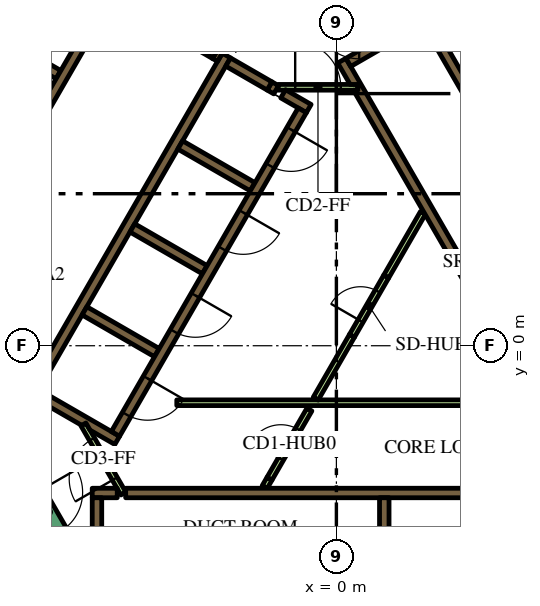
"""IFC4 building model, lengths in metres.
Left out: names, types, materials, properties, quantities, classifications, styles, units other than length and angle.
Written with IfcOpenShell. Run it as: python <this file> out.ifc"""

import sys

from ifc_helpers import new_model, si_unit, direction, frame, frame_2d, origin, place, context, subcontext, project, spatial, polyline, rectangle, outline, extrude, element, fill, save


model = new_model("IFC4")
c1 = context("Model", 3, precision=1e-05, world=origin(), true_north=direction((0.0, 1.0)))
c2 = subcontext(c1, "Body", "Model", "MODEL_VIEW")
j1 = project(units=[si_unit("LENGTHUNIT", "METRE"), si_unit("PLANEANGLEUNIT", "RADIAN")], contexts=[c1])
p1 = place(None, origin())
s1 = spatial("IfcSite", under=j1, at=p1, CompositionType="ELEMENT")
p2 = place(p1, origin())
s2 = spatial("IfcBuilding", under=s1, at=p2, CompositionType="ELEMENT")
p3 = place(p2, frame((0.0, 0.0, 95.4)))
s3 = spatial("IfcBuildingStorey", under=s2, at=p3, CompositionType="ELEMENT", Elevation=95.4)
p4 = place(p3, frame((-15.36, -1.503, 0.0), z_axis=(0.0, 0.0, 1.0), x_axis=(0.50000389221, 0.866023156604, 0.0)))
e1 = element("IfcWall", 1, at=p4, inside=s3, PredefinedType="SOLIDWALL", context=c2, shape_type="SweptSolid", body=[
    extrude(rectangle(XDim=21.0, YDim=0.9, at=frame_2d((10.5, 0.0))), origin(), (0.0, 0.0, 1.0), 3.9),
])
p5 = place(p3, frame((-5.545, -3.875, 0.0), z_axis=(0.0, 0.0, 1.0), x_axis=(1.0, 0.0, 0.0)))
e2 = element("IfcWall", 2, at=p5, inside=s3, PredefinedType="SOLIDWALL", context=c2, shape_type="SweptSolid", body=[
    extrude(rectangle(XDim=11.97, YDim=0.25, at=frame_2d((5.985, 0.0))), origin(), (0.0, 0.0, 1.0), 3.9),
])
p6 = place(p3, frame((-6.425, -3.875, 0.0), z_axis=(0.0, 0.0, 1.0), x_axis=(1.0, 0.0, 0.0)))
e3 = element("IfcWall", 3, at=p6, inside=s3, PredefinedType="SOLIDWALL", context=c2, shape_type="SweptSolid", body=[
    extrude(rectangle(XDim=0.658, YDim=0.25, at=frame_2d((0.329, 0.0))), origin(), (0.0, 0.0, 1.0), 3.9),
])
p7 = place(p3, frame((1.26, -4.0, 0.0), z_axis=(0.0, 0.0, 1.0), x_axis=(0.0, -1.0, 0.0)))
e4 = element("IfcWall", 4, at=p7, inside=s3, PredefinedType="SOLIDWALL", context=c2, shape_type="SweptSolid", body=[
    extrude(rectangle(XDim=2.2, YDim=0.25, at=frame_2d((1.1, 0.0))), origin(), (0.0, 0.0, 1.0), 3.9),
])
p8 = place(p3, frame((-6.3, -4.0, 0.0), z_axis=(0.0, 0.0, 1.0), x_axis=(0.0, -1.0, 0.0)))
e5 = element("IfcWall", 5, at=p8, inside=s3, PredefinedType="SOLIDWALL", context=c2, shape_type="SweptSolid", body=[
    extrude(rectangle(XDim=3.154, YDim=0.25, at=frame_2d((1.577, 0.0))), origin(), (0.0, 0.0, 1.0), 3.9),
])
p9 = place(p3, origin())
e6 = element("IfcWall", 6, at=p9, inside=s3, PredefinedType="SOLIDWALL", context=c2, shape_type="SweptSolid", body=[
    extrude(outline(polyline([(0.566, 6.725), (0.566, 6.875), (0.566, 6.875), (0.565, 6.875), (0.361, 6.875), (0.035, 7.439), (0.252, 7.564), (0.377, 7.348), (6.552, -3.348), (6.677, -3.564), (6.46, -3.689), (0.448, 6.725), (0.565, 6.725), (0.566, 6.725), (0.566, 6.725)])), origin(), (0.0, 0.0, 1.0), 3.9),
])
p10 = place(p3, frame((0.314, 7.456, 0.0), z_axis=(0.0, 0.0, 1.0), x_axis=(0.866013897511, 0.50001992892, 0.0)))
e7 = element("IfcWall", 7, at=p10, inside=s3, PredefinedType="SOLIDWALL", context=c2, shape_type="SweptSolid", body=[
    extrude(rectangle(XDim=3.268, YDim=0.25, at=frame_2d((1.634, 0.0))), origin(), (0.0, 0.0, 1.0), 3.9),
])
p11 = place(p3, frame((-8.06, -1.311, 0.0), z_axis=(0.0, 0.0, 1.0), x_axis=(0.50000273126, 0.866023826885, 0.0)))
e8 = element("IfcWall", 8, at=p11, inside=s3, PredefinedType="SOLIDWALL", context=c2, shape_type="SweptSolid", body=[
    extrude(rectangle(XDim=10.33, YDim=0.25, at=frame_2d((5.165, 0.0))), origin(), (0.0, 0.0, 1.0), 3.9),
])
p12 = place(p3, frame((-1.758, 6.835, 0.0), z_axis=(0.0, 0.0, 1.0), x_axis=(0.865982457891, -0.500074377092, 0.0)))
e9 = element("IfcWall", 9, at=p12, inside=s3, PredefinedType="SOLIDWALL", context=c2, shape_type="SweptSolid", body=[
    extrude(rectangle(XDim=0.2, YDim=0.25, at=frame_2d((0.1, 0.0))), origin(), (0.0, 0.0, 1.0), 3.9),
])
p13 = place(p3, frame((-1.76, 6.836, 0.0), z_axis=(0.0, 0.0, 1.0), x_axis=(-0.865952863304, 0.500125622755, 0.0)))
e10 = element("IfcWall", 10, at=p13, inside=s3, PredefinedType="SOLIDWALL", context=c2, shape_type="SweptSolid", body=[
    extrude(rectangle(XDim=1.258, YDim=0.25, at=frame_2d((0.629, 0.0))), origin(), (0.0, 0.0, 1.0), 3.9),
])
p14 = place(p3, frame((-0.728, 6.24, 0.0), z_axis=(0.0, 0.0, 1.0), x_axis=(-0.865955664968, 0.500120771724, 0.0)))
e11 = element("IfcWall", 11, at=p14, inside=s3, PredefinedType="SOLIDWALL", context=c2, shape_type="SweptSolid", body=[
    extrude(rectangle(XDim=0.778, YDim=0.25, at=frame_2d((0.389, 0.0))), origin(), (0.0, 0.0, 1.0), 3.9),
])
for number, where, z_axis, x_axis in (
    (12, (-2.204, 4.182, 0.0), (0.0, 0.0, 1.0), (-0.866, 0.5, 0.0)),
    (13, (-5.369, 3.1, 0.0), (0.0, 0.0, 1.0), (0.866, -0.5, 0.0)),
    (14, (-4.724, -0.182, 0.0), (0.0, 0.0, 1.0), (-0.866, 0.5, 0.0)),
):
    element("IfcWall", number, at=place(p3, frame(where, z_axis=z_axis, x_axis=x_axis)), inside=s3, PredefinedType="SOLIDWALL", context=c2, shape_type="SweptSolid", body=[
        extrude(rectangle(XDim=2.2, YDim=0.25, at=frame_2d((1.1, 0.0))), origin(), (0.0, 0.0, 1.0), 3.9),
    ])
e15 = element("IfcWall", 15, at=p9, inside=s3, PredefinedType="SOLIDWALL", context=c2, shape_type="SweptSolid", body=[
    extrude(outline(polyline([(-5.922, -2.257), (-5.922, -2.257), (-5.705, -2.382), (-5.83, -2.598), (-6.483, -2.221), (-6.591, -2.033), (-6.591, -2.033), (-6.7, -2.096), (-7.952, -1.373), (-7.827, -1.156), (-5.922, -2.257)])), origin(), (0.0, 0.0, 1.0), 3.9),
])
e16 = element("IfcWall", 16, at=p9, inside=s3, PredefinedType="SOLIDWALL", context=c2, shape_type="SweptSolid", body=[
    extrude(outline(polyline([(-3.128, 7.481), (-3.259, 7.557), (-3.134, 7.773), (-3.003, 7.698), (-3.128, 7.481)])), origin(), (0.0, 0.0, 1.0), 3.9),
])
p15 = place(p3, frame((-7.314, 7.132, 0.0), z_axis=(0.0, 0.0, 1.0), x_axis=(-0.866008176907, 0.50002983664, 0.0)))
e17 = element("IfcWall", 17, at=p15, inside=s3, PredefinedType="SOLIDWALL", context=c2, shape_type="SweptSolid", body=[
    extrude(rectangle(XDim=2.2, YDim=0.25, at=frame_2d((1.1, 0.0))), origin(), (0.0, 0.0, 1.0), 3.9),
])
p16 = place(p3, frame((-1.887, -3.718, 0.0), z_axis=(0.0, 0.0, 1.0), x_axis=(0.500165633897, 0.865929753888, 0.0)))
e18 = element("IfcWall", 18, at=p16, inside=s3, PredefinedType="PARTITIONING", context=c2, shape_type="SweptSolid", body=[
    extrude(rectangle(XDim=0.254, YDim=0.15, at=frame_2d((0.127, 0.0))), origin(), (0.0, 0.0, 1.0), 2.75),
])
p17 = place(p3, frame((-4.2, -1.5, 0.0), z_axis=(0.0, 0.0, 1.0), x_axis=(1.0, 0.0, 0.0)))
e19 = element("IfcWall", 19, at=p17, inside=s3, PredefinedType="PARTITIONING", context=c2, shape_type="SweptSolid", body=[
    extrude(rectangle(XDim=9.359, YDim=0.15, at=frame_2d((4.68, 0.0))), origin(), (0.0, 0.0, 1.0), 2.75),
])
p18 = place(p3, frame((-0.544, -1.393, 0.0), z_axis=(0.0, 0.0, 1.0), x_axis=(0.499928740635, 0.866066541489, 0.0)))
e20 = element("IfcWall", 20, at=p18, inside=s3, PredefinedType="PARTITIONING", context=c2, shape_type="SweptSolid", body=[
    extrude(rectangle(XDim=1.912, YDim=0.15, at=frame_2d((0.956, 0.0))), origin(), (0.0, 0.0, 1.0), 2.75),
])
p19 = place(p3, frame((1.312, 1.822, 0.0), z_axis=(0.0, 0.0, 1.0), x_axis=(0.500003549559, 0.866023354436, 0.0)))
e21 = element("IfcWall", 21, at=p19, inside=s3, PredefinedType="PARTITIONING", context=c2, shape_type="SweptSolid", body=[
    extrude(rectangle(XDim=1.93, YDim=0.15, at=frame_2d((0.965, 0.0))), origin(), (0.0, 0.0, 1.0), 2.75),
])
p20 = place(p3, frame((8.565, -2.185, 0.0), z_axis=(0.0, 0.0, 1.0), x_axis=(-0.499997954832, 0.866026584559, 0.0)))
e22 = element("IfcWall", 22, at=p20, inside=s3, PredefinedType="SOLIDWALL", context=c2, shape_type="SweptSolid", body=[
    extrude(rectangle(XDim=12.35, YDim=0.25, at=frame_2d((6.175, 0.0))), origin(), (0.0, 0.0, 1.0), 3.9),
])
p21 = place(p20, frame((5.725, 0.0, 0.0)))
e23 = element("IfcOpeningElement", 23, at=p21, cuts=e22, PredefinedType="OPENING", context=c2, shape_type="SweptSolid", body=[
    extrude(rectangle(XDim=0.9, YDim=2.1, at=frame_2d((0.45, 1.05))), frame((0.0, 0.135, 0.0), z_axis=(0.0, -1.0, 0.0), x_axis=(1.0, 0.0, 0.0)), (0.0, 0.0, 1.0), 0.27),
])
p22 = place(p3, frame((-6.008, 9.144, 0.0), z_axis=(0.0, 0.0, 1.0), x_axis=(-0.500006956611, -0.866021387346, 0.0)))
e24 = element("IfcWall", 24, at=p22, inside=s3, PredefinedType="SOLIDWALL", context=c2, shape_type="SweptSolid", body=[
    extrude(rectangle(XDim=9.83, YDim=0.25, at=frame_2d((4.915, 0.0))), origin(), (0.0, 0.0, 1.0), 3.9),
])
p23 = place(p22, frame((6.985, 0.0, 0.0)))
e25 = element("IfcOpeningElement", 25, at=p23, cuts=e24, PredefinedType="OPENING", context=c2, shape_type="SweptSolid", body=[
    extrude(rectangle(XDim=0.9, YDim=2.1, at=frame_2d((0.45, 1.05))), frame((0.0, 0.135, 0.0), z_axis=(0.0, -1.0, 0.0), x_axis=(1.0, 0.0, 0.0)), (0.0, 0.0, 1.0), 0.27),
])
p24 = place(p3, frame((-0.898, 6.194, 0.0), z_axis=(0.0, 0.0, 1.0), x_axis=(-0.499996202215, -0.866027596426, 0.0)))
e26 = element("IfcWall", 26, at=p24, inside=s3, PredefinedType="SOLIDWALL", context=c2, shape_type="SweptSolid", body=[
    extrude(rectangle(XDim=9.83, YDim=0.25, at=frame_2d((4.915, 0.0))), origin(), (0.0, 0.0, 1.0), 3.9),
])
p25 = place(p24, frame((0.585, 0.0, 0.0)))
e27 = element("IfcOpeningElement", 27, at=p25, cuts=e26, PredefinedType="OPENING", context=c2, shape_type="SweptSolid", body=[
    extrude(rectangle(XDim=1.1, YDim=2.1, at=frame_2d((0.55, 1.05))), frame((0.0, 0.135, 0.0), z_axis=(0.0, -1.0, 0.0), x_axis=(1.0, 0.0, 0.0)), (0.0, 0.0, 1.0), 0.27),
])
p26 = place(p24, frame((3.105, 0.0, 0.0)))
e28 = element("IfcOpeningElement", 28, at=p26, cuts=e26, PredefinedType="OPENING", context=c2, shape_type="SweptSolid", body=[
    extrude(rectangle(XDim=1.1, YDim=2.1, at=frame_2d((0.55, 1.05))), frame((0.0, 0.135, 0.0), z_axis=(0.0, -1.0, 0.0), x_axis=(1.0, 0.0, 0.0)), (0.0, 0.0, 1.0), 0.27),
])
p27 = place(p24, frame((5.625, 0.0, 0.0)))
e29 = element("IfcOpeningElement", 29, at=p27, cuts=e26, PredefinedType="OPENING", context=c2, shape_type="SweptSolid", body=[
    extrude(rectangle(XDim=1.1, YDim=2.1, at=frame_2d((0.55, 1.05))), frame((0.0, 0.135, 0.0), z_axis=(0.0, -1.0, 0.0), x_axis=(1.0, 0.0, 0.0)), (0.0, 0.0, 1.0), 0.27),
])
p28 = place(p24, frame((8.145, 0.0, 0.0)))
e30 = element("IfcOpeningElement", 30, at=p28, cuts=e26, PredefinedType="OPENING", context=c2, shape_type="SweptSolid", body=[
    extrude(rectangle(XDim=1.1, YDim=2.1, at=frame_2d((0.55, 1.05))), frame((0.0, 0.135, 0.0), z_axis=(0.0, -1.0, 0.0), x_axis=(1.0, 0.0, 0.0)), (0.0, 0.0, 1.0), 0.27),
])
p29 = place(p3, frame((-8.103, -3.466, 0.0), z_axis=(0.0, 0.0, 1.0), x_axis=(0.500078061341, -0.865980330357, 0.0)))
e31 = element("IfcWall", 31, at=p29, inside=s3, PredefinedType="SOLIDWALL", context=c2, shape_type="SweptSolid", body=[
    extrude(rectangle(XDim=2.1, YDim=0.4, at=frame_2d((1.05, 0.0))), origin(), (0.0, 0.0, 1.0), 3.9),
])
p30 = place(p29, frame((0.45, 0.0, 0.0)))
e32 = element("IfcOpeningElement", 32, at=p30, cuts=e31, PredefinedType="OPENING", context=c2, shape_type="SweptSolid", body=[
    extrude(rectangle(XDim=1.2, YDim=2.1, at=frame_2d((0.6, 1.05))), frame((0.0, 0.21, 0.0), z_axis=(0.0, -1.0, 0.0), x_axis=(1.0, 0.0, 0.0)), (0.0, 0.0, 1.0), 0.42),
])
p31 = place(p3, frame((-1.76, -3.498, 0.0), z_axis=(0.0, 0.0, 1.0), x_axis=(0.499977374825, 0.866038466041, 0.0)))
e33 = element("IfcWall", 33, at=p31, inside=s3, PredefinedType="PARTITIONING", context=c2, shape_type="SweptSolid", body=[
    extrude(rectangle(XDim=2.1, YDim=0.15, at=frame_2d((1.05, 0.0))), origin(), (0.0, 0.0, 1.0), 2.75),
])
p32 = place(p31, frame((0.6, 0.0, 0.0)))
e34 = element("IfcOpeningElement", 34, at=p32, cuts=e33, PredefinedType="OPENING", context=c2, shape_type="SweptSolid", body=[
    extrude(rectangle(XDim=0.9, YDim=2.1, at=frame_2d((0.45, 1.05))), frame((0.0, 0.085, 0.0), z_axis=(0.0, -1.0, 0.0), x_axis=(1.0, 0.0, 0.0)), (0.0, 0.0, 1.0), 0.17),
])
p33 = place(p3, frame((-1.534, 6.8, 0.0), z_axis=(0.0, 0.0, 1.0), x_axis=(1.0, 0.0, 0.0)))
e35 = element("IfcWall", 35, at=p33, inside=s3, PredefinedType="PARTITIONING", context=c2, shape_type="SweptSolid", body=[
    extrude(rectangle(XDim=2.1, YDim=0.15, at=frame_2d((1.05, 0.0))), origin(), (0.0, 0.0, 1.0), 2.75),
])
p34 = place(p33, frame((0.45, 0.0, 0.0)))
e36 = element("IfcOpeningElement", 36, at=p34, cuts=e35, PredefinedType="OPENING", context=c2, shape_type="SweptSolid", body=[
    extrude(rectangle(XDim=1.2, YDim=2.1, at=frame_2d((0.6, 1.05))), frame((0.0, 0.085, 0.0), z_axis=(0.0, -1.0, 0.0), x_axis=(1.0, 0.0, 0.0)), (0.0, 0.0, 1.0), 0.17),
])
p35 = place(p3, frame((-5.606, -3.89, 0.0), z_axis=(0.0, 0.0, 1.0), x_axis=(-0.500027713859, 0.866009402589, 0.0)))
e37 = element("IfcWall", 37, at=p35, inside=s3, PredefinedType="PARTITIONING", context=c2, shape_type="SweptSolid", body=[
    extrude(rectangle(XDim=2.1, YDim=0.15, at=frame_2d((1.05, 0.0))), origin(), (0.0, 0.0, 1.0), 2.75),
])
p36 = place(p35, frame((0.45, 0.0, 0.0)))
e38 = element("IfcOpeningElement", 38, at=p36, cuts=e37, PredefinedType="OPENING", context=c2, shape_type="SweptSolid", body=[
    extrude(rectangle(XDim=1.2, YDim=2.1, at=frame_2d((0.6, 1.05))), frame((0.0, 0.085, 0.0), z_axis=(0.0, -1.0, 0.0), x_axis=(1.0, 0.0, 0.0)), (0.0, 0.0, 1.0), 0.17),
])
p37 = place(p3, frame((-4.409, 8.365, 0.0), z_axis=(0.0, 0.0, 1.0), x_axis=(0.866034573852, -0.49998411664, 0.0)))
e39 = element("IfcWall", 39, at=p37, inside=s3, PredefinedType="SOLIDWALL", context=c2, shape_type="SweptSolid", body=[
    extrude(rectangle(XDim=1.4, YDim=0.25, at=frame_2d((0.7, 0.0))), origin(), (0.0, 0.0, 1.0), 3.9),
])
p38 = place(p37, frame((0.1, 0.0, 0.0)))
e40 = element("IfcOpeningElement", 40, at=p38, cuts=e39, PredefinedType="OPENING", context=c2, shape_type="SweptSolid", body=[
    extrude(rectangle(XDim=1.2, YDim=2.1, at=frame_2d((0.6, 1.05))), frame((0.0, 0.135, 0.0), z_axis=(0.0, -1.0, 0.0), x_axis=(1.0, 0.0, 0.0)), (0.0, 0.0, 1.0), 0.27),
])
p39 = place(p3, frame((0.412, 0.263, 0.0), z_axis=(0.0, 0.0, 1.0), x_axis=(0.500062916607, 0.865989075817, 0.0)))
e41 = element("IfcWall", 41, at=p39, inside=s3, PredefinedType="PARTITIONING", context=c2, shape_type="SweptSolid", body=[
    extrude(rectangle(XDim=1.8, YDim=0.15, at=frame_2d((0.9, 0.0))), origin(), (0.0, 0.0, 1.0), 2.75),
])
p40 = place(p39, frame((0.45, 0.0, 0.0)))
e42 = element("IfcOpeningElement", 42, at=p40, cuts=e41, PredefinedType="OPENING", context=c2, shape_type="SweptSolid", body=[
    extrude(rectangle(XDim=0.9, YDim=2.1, at=frame_2d((0.45, 1.05))), frame((0.0, 0.085, 0.0), z_axis=(0.0, -1.0, 0.0), x_axis=(1.0, 0.0, 0.0)), (0.0, 0.0, 1.0), 0.17),
])
p41 = place(p3, frame((-19.081, -3.9, 0.0), z_axis=(0.0, 0.0, 1.0), x_axis=(0.499998313975, 0.866026377209, 0.0)))
e43 = element("IfcWall", 43, at=p41, inside=s3, PredefinedType="PARTITIONING", context=c2, shape_type="SweptSolid", body=[
    extrude(rectangle(XDim=25.766, YDim=0.15, at=frame_2d((12.883, 0.0))), origin(), (0.0, 0.0, 1.0), 2.75),
])
p42 = place(p41, frame((19.306, 0.0, 0.0)))
e44 = element("IfcOpeningElement", 44, at=p42, cuts=e43, PredefinedType="OPENING", context=c2, shape_type="SweptSolid", body=[
    extrude(rectangle(XDim=1.0, YDim=2.1, at=frame_2d((0.5, 1.05))), frame((0.0, 0.085, 0.0), z_axis=(0.0, -1.0, 0.0), x_axis=(1.0, 0.0, 0.0)), (0.0, 0.0, 1.0), 0.17),
])
p43 = place(p41, frame((17.144, 0.0, 0.0)))
e45 = element("IfcOpeningElement", 45, at=p43, cuts=e43, PredefinedType="OPENING", context=c2, shape_type="SweptSolid", body=[
    extrude(rectangle(XDim=0.9, YDim=2.1, at=frame_2d((0.45, 1.05))), frame((0.0, 0.085, 0.0), z_axis=(0.0, -1.0, 0.0), x_axis=(1.0, 0.0, 0.0)), (0.0, 0.0, 1.0), 0.17),
])
p44 = place(p41, frame((9.955, 0.0, 0.0)))
e46 = element("IfcOpeningElement", 46, at=p44, cuts=e43, PredefinedType="OPENING", context=c2, shape_type="SweptSolid", body=[
    extrude(rectangle(XDim=1.1, YDim=2.1, at=frame_2d((0.55, 1.05))), frame((0.0, 0.085, 0.0), z_axis=(0.0, -1.0, 0.0), x_axis=(1.0, 0.0, 0.0)), (0.0, 0.0, 1.0), 0.17),
])
p45 = place(p41, frame((8.648, 0.0, 0.0)))
e47 = element("IfcOpeningElement", 47, at=p45, cuts=e43, PredefinedType="OPENING", context=c2, shape_type="SweptSolid", body=[
    extrude(rectangle(XDim=1.0, YDim=2.1, at=frame_2d((0.5, 1.05))), frame((0.0, 0.085, 0.0), z_axis=(0.0, -1.0, 0.0), x_axis=(1.0, 0.0, 0.0)), (0.0, 0.0, 1.0), 0.17),
])
p46 = place(p41, frame((1.553, 0.0, 0.0)))
e48 = element("IfcOpeningElement", 48, at=p46, cuts=e43, PredefinedType="OPENING", context=c2, shape_type="SweptSolid", body=[
    extrude(rectangle(XDim=0.9, YDim=2.1, at=frame_2d((0.45, 1.05))), frame((0.0, 0.085, 0.0), z_axis=(0.0, -1.0, 0.0), x_axis=(1.0, 0.0, 0.0)), (0.0, 0.0, 1.0), 0.17),
])
p47 = place(p25, origin())
e49 = element("IfcDoor", 49, at=p47, inside=s3, OperationType="DOUBLE_DOOR_SLIDING", PredefinedType="DOOR", context=c2, shape_type="SweptSolid", body=[
    extrude(rectangle(XDim=1.1, YDim=2.1, at=frame_2d((0.55, 1.05))), frame((0.0, 0.025, 0.0), z_axis=(0.0, -1.0, 0.0), x_axis=(1.0, 0.0, 0.0)), (0.0, 0.0, 1.0), 0.05),
])
fill(e27, e49)
p48 = place(p26, origin())
e50 = element("IfcDoor", 50, at=p48, inside=s3, OperationType="DOUBLE_DOOR_SLIDING", PredefinedType="DOOR", context=c2, shape_type="SweptSolid", body=[
    extrude(rectangle(XDim=1.1, YDim=2.1, at=frame_2d((0.55, 1.05))), frame((0.0, 0.025, 0.0), z_axis=(0.0, -1.0, 0.0), x_axis=(1.0, 0.0, 0.0)), (0.0, 0.0, 1.0), 0.05),
])
fill(e28, e50)
p49 = place(p27, origin())
e51 = element("IfcDoor", 51, at=p49, inside=s3, OperationType="DOUBLE_DOOR_SLIDING", PredefinedType="DOOR", context=c2, shape_type="SweptSolid", body=[
    extrude(rectangle(XDim=1.1, YDim=2.1, at=frame_2d((0.55, 1.05))), frame((0.0, 0.025, 0.0), z_axis=(0.0, -1.0, 0.0), x_axis=(1.0, 0.0, 0.0)), (0.0, 0.0, 1.0), 0.05),
])
fill(e29, e51)
p50 = place(p28, origin())
e52 = element("IfcDoor", 52, at=p50, inside=s3, OperationType="DOUBLE_DOOR_SLIDING", PredefinedType="DOOR", context=c2, shape_type="SweptSolid", body=[
    extrude(rectangle(XDim=1.1, YDim=2.1, at=frame_2d((0.55, 1.05))), frame((0.0, 0.025, 0.0), z_axis=(0.0, -1.0, 0.0), x_axis=(1.0, 0.0, 0.0)), (0.0, 0.0, 1.0), 0.05),
])
fill(e30, e52)
p51 = place(p30, origin())
e53 = element("IfcDoor", 53, at=p51, inside=s3, OperationType="SINGLE_SWING_LEFT", PredefinedType="DOOR", context=c2, shape_type="SweptSolid", body=[
    extrude(rectangle(XDim=1.2, YDim=2.1, at=frame_2d((0.6, 1.05))), frame((0.0, 0.025, 0.0), z_axis=(0.0, -1.0, 0.0), x_axis=(1.0, 0.0, 0.0)), (0.0, 0.0, 1.0), 0.05),
])
fill(e32, e53)
p52 = place(p32, origin())
e54 = element("IfcDoor", 54, at=p52, inside=s3, OperationType="SINGLE_SWING_LEFT", PredefinedType="DOOR", context=c2, shape_type="SweptSolid", body=[
    extrude(rectangle(XDim=0.9, YDim=2.1, at=frame_2d((0.45, 1.05))), frame((0.0, 0.025, 0.0), z_axis=(0.0, -1.0, 0.0), x_axis=(1.0, 0.0, 0.0)), (0.0, 0.0, 1.0), 0.05),
])
fill(e34, e54)
p53 = place(p34, origin())
e55 = element("IfcDoor", 55, at=p53, inside=s3, OperationType="SINGLE_SWING_LEFT", PredefinedType="DOOR", context=c2, shape_type="SweptSolid", body=[
    extrude(rectangle(XDim=1.2, YDim=2.1, at=frame_2d((0.6, 1.05))), frame((0.0, 0.025, 0.0), z_axis=(0.0, -1.0, 0.0), x_axis=(1.0, 0.0, 0.0)), (0.0, 0.0, 1.0), 0.05),
])
fill(e36, e55)
p54 = place(p36, origin())
e56 = element("IfcDoor", 56, at=p54, inside=s3, OperationType="SINGLE_SWING_LEFT", PredefinedType="DOOR", context=c2, shape_type="SweptSolid", body=[
    extrude(rectangle(XDim=1.2, YDim=2.1, at=frame_2d((0.6, 1.05))), frame((0.0, 0.025, 0.0), z_axis=(0.0, -1.0, 0.0), x_axis=(1.0, 0.0, 0.0)), (0.0, 0.0, 1.0), 0.05),
])
fill(e38, e56)
p55 = place(p38, origin())
e57 = element("IfcDoor", 57, at=p55, inside=s3, OperationType="SINGLE_SWING_LEFT", PredefinedType="DOOR", context=c2, shape_type="SweptSolid", body=[
    extrude(rectangle(XDim=1.2, YDim=2.1, at=frame_2d((0.6, 1.05))), frame((0.0, 0.025, 0.0), z_axis=(0.0, -1.0, 0.0), x_axis=(1.0, 0.0, 0.0)), (0.0, 0.0, 1.0), 0.05),
])
fill(e40, e57)
p56 = place(p40, origin())
e58 = element("IfcDoor", 58, at=p56, inside=s3, OperationType="SINGLE_SWING_LEFT", PredefinedType="DOOR", context=c2, shape_type="SweptSolid", body=[
    extrude(rectangle(XDim=0.9, YDim=2.1, at=frame_2d((0.45, 1.05))), frame((0.0, 0.025, 0.0), z_axis=(0.0, -1.0, 0.0), x_axis=(1.0, 0.0, 0.0)), (0.0, 0.0, 1.0), 0.05),
])
fill(e42, e58)
save(model, sys.argv[1])
